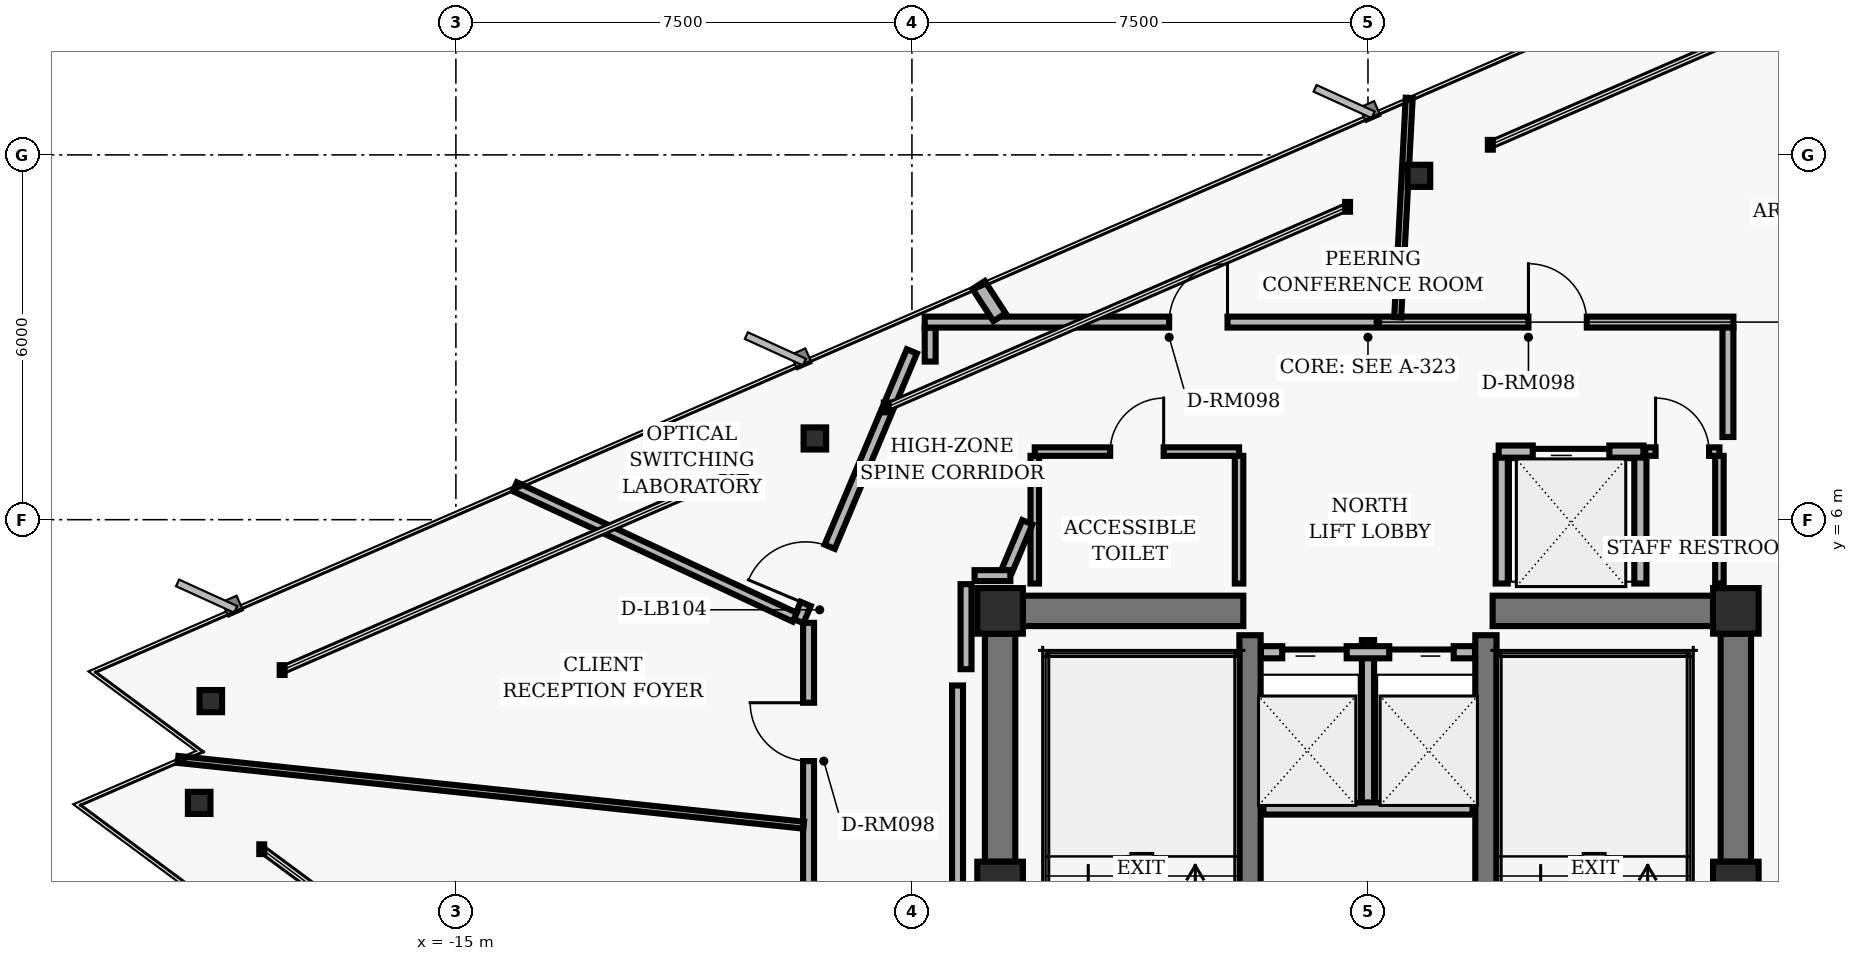
"""IFC4 building model, lengths in metres.
Left out: names, types, materials, properties, quantities, classifications, styles, units other than length and angle.
Written with IfcOpenShell. Run it as: python <this file> out.ifc"""

import sys

from ifc_helpers import new_model, si_unit, direction, frame, frame_2d, origin, origin_2d, place, context, subcontext, project, spatial, rectangle, hollow_rectangle, i_section, extrude, element, fill, save


model = new_model("IFC4")
c1 = context("Model", 3, precision=1e-05, world=origin(), true_north=direction((0.0, 1.0)))
c2 = subcontext(c1, "Body", "Model", "MODEL_VIEW")
j1 = project(units=[si_unit("LENGTHUNIT", "METRE"), si_unit("PLANEANGLEUNIT", "RADIAN")], contexts=[c1])
p1 = place(None, origin())
s1 = spatial("IfcSite", under=j1, at=p1, CompositionType="ELEMENT")
p2 = place(p1, origin())
s2 = spatial("IfcBuilding", under=s1, at=p2, CompositionType="ELEMENT")
p3 = place(p2, frame((0.0, 0.0, 230.08)))
s3 = spatial("IfcBuildingStorey", under=s2, at=p3, CompositionType="ELEMENT", Elevation=230.08)
for number, where, z_axis, x_axis in (
    (1, (-6.05, 4.5, 0.0), (0.0, 0.0, 1.0), (1.0, 0.0, 0.0)),
    (2, (6.05, 4.5, 0.0), (0.0, 0.0, 1.0), (1.0, 0.0, 0.0)),
    (3, (-6.05, 0.0, 0.0), (0.0, 0.0, 1.0), (1.0, 0.0, 0.0)),
    (4, (6.05, 0.0, 0.0), (0.0, 0.0, 1.0), (1.0, 0.0, 0.0)),
):
    element("IfcColumn", number, at=place(p3, frame(where, z_axis=z_axis, x_axis=x_axis)), inside=s3, PredefinedType="COLUMN", context=c2, shape_type="SweptSolid", body=[
        extrude(hollow_rectangle(XDim=0.75, YDim=0.75, WallThickness=0.05, InnerFilletRadius=0.02, OuterFilletRadius=0.04, at=origin_2d()), origin(), (0.0, 0.0, 1.0), 3.04),
    ])
for number, where, z_axis, x_axis in (
    (5, (-6.05, 0.375, 0.0), (0.0, 0.0, 1.0), (0.0, 1.0, 0.0)),
    (6, (6.05, 0.375, 0.0), (0.0, 0.0, 1.0), (0.0, 1.0, 0.0)),
):
    element("IfcWall", number, at=place(p3, frame(where, z_axis=z_axis, x_axis=x_axis)), inside=s3, PredefinedType="SHEAR", context=c2, shape_type="SweptSolid", body=[
        extrude(rectangle(XDim=3.75, YDim=0.5, at=frame_2d((1.875, 0.0))), origin(), (0.0, 0.0, 1.0), 2.798),
    ])
for number, where, z_axis, x_axis in (
    (7, (-1.94, -4.1, 0.0), (0.0, 0.0, 1.0), (0.0, 1.0, 0.0)),
    (8, (1.94, -4.1, 0.0), (0.0, 0.0, 1.0), (0.0, 1.0, 0.0)),
):
    element("IfcWall", number, at=place(p3, frame(where, z_axis=z_axis, x_axis=x_axis)), inside=s3, PredefinedType="SHEAR", context=c2, shape_type="SweptSolid", body=[
        extrude(rectangle(XDim=8.2, YDim=0.35, at=frame_2d((4.1, 0.0))), origin(), (0.0, 0.0, 1.0), 2.798),
    ])
for number, where, z_axis, x_axis in (
    (9, (-5.675, 4.5, 0.0), (0.0, 0.0, 1.0), (1.0, 0.0, 0.0)),
    (10, (2.05, 4.5, 0.0), (0.0, 0.0, 1.0), (1.0, 0.0, 0.0)),
):
    element("IfcWall", number, at=place(p3, frame(where, z_axis=z_axis, x_axis=x_axis)), inside=s3, PredefinedType="SHEAR", context=c2, shape_type="SweptSolid", body=[
        extrude(rectangle(XDim=3.625, YDim=0.5, at=frame_2d((1.812, 0.0))), origin(), (0.0, 0.0, 1.0), 2.798),
    ])
for number, where, z_axis, x_axis in (
    (11, (0.838, 11.656, 0.0), (0.0, 0.0, 1.0), (1.0, 0.0, 0.0)),
    (12, (-9.096, 7.336, 0.0), (0.0, 0.0, 1.0), (1.0, 0.0, 0.0)),
    (13, (-19.031, 3.016, 0.0), (0.0, 0.0, 1.0), (1.0, 0.0, 0.0)),
    (14, (-19.222, 1.342, 0.0), (0.0, 0.0, 1.0), (1.0, 0.0, 0.0)),
):
    element("IfcColumn", number, at=place(p3, frame(where, z_axis=z_axis, x_axis=x_axis)), inside=s3, PredefinedType="COLUMN", context=c2, shape_type="SweptSolid", body=[
        extrude(i_section(OverallWidth=0.371, OverallDepth=0.364, WebThickness=0.013, FlangeThickness=0.022, FilletRadius=0.015, at=origin_2d()), origin(), (0.0, 0.0, 1.0), 3.04),
    ])
p4 = place(p3, frame((0.0, 1.25, 0.0), z_axis=(0.0, 0.0, 1.0), x_axis=(0.0, 1.0, 0.0)))
e15 = element("IfcWall", 15, at=p4, inside=s3, PredefinedType="PARTITIONING", context=c2, shape_type="SweptSolid", body=[
    extrude(rectangle(XDim=2.77, YDim=0.2, at=frame_2d((1.385, 0.0))), origin(), (0.0, 0.0, 1.0), 2.773),
])
p5 = place(p3, frame((-1.72, 1.25, 0.0), z_axis=(0.0, 0.0, 1.0), x_axis=(1.0, 0.0, 0.0)))
e16 = element("IfcWall", 16, at=p5, inside=s3, PredefinedType="PARTITIONING", context=c2, shape_type="SweptSolid", body=[
    extrude(rectangle(XDim=3.44, YDim=0.2, at=frame_2d((1.72, 0.0))), origin(), (0.0, 0.0, 1.0), 2.773),
])
p6 = place(p3, frame((-1.76, 3.82, 0.0), z_axis=(0.0, 0.0, 1.0), x_axis=(1.0, 0.0, 0.0)))
e17 = element("IfcWall", 17, at=p6, inside=s3, PredefinedType="PARTITIONING", context=c2, shape_type="SweptSolid", body=[
    extrude(rectangle(XDim=3.52, YDim=0.2, at=frame_2d((1.76, 0.0))), origin(), (0.0, 0.0, 1.0), 2.773),
])
p7 = place(p6, frame((0.35, 0.0, 0.0)))
e18 = element("IfcOpeningElement", 18, at=p7, cuts=e17, PredefinedType="OPENING", context=c2, shape_type="SweptSolid", body=[
    extrude(rectangle(XDim=1.06, YDim=2.04, at=frame_2d((0.53, 1.02))), frame((0.0, 0.11, 0.0), z_axis=(0.0, -1.0, 0.0), x_axis=(1.0, 0.0, 0.0)), (0.0, 0.0, 1.0), 0.22),
])
p8 = place(p6, frame((2.11, 0.0, 0.0)))
e19 = element("IfcOpeningElement", 19, at=p8, cuts=e17, PredefinedType="OPENING", context=c2, shape_type="SweptSolid", body=[
    extrude(rectangle(XDim=1.06, YDim=2.04, at=frame_2d((0.53, 1.02))), frame((0.0, 0.11, 0.0), z_axis=(0.0, -1.0, 0.0), x_axis=(1.0, 0.0, 0.0)), (0.0, 0.0, 1.0), 0.22),
])
for number, where, z_axis, x_axis in (
    (20, (2.2, 4.95, 0.0), (0.0, 0.0, 1.0), (0.0, 1.0, 0.0)),
    (21, (4.48, 4.95, 0.0), (0.0, 0.0, 1.0), (0.0, 1.0, 0.0)),
):
    element("IfcWall", number, at=place(p3, frame(where, z_axis=z_axis, x_axis=x_axis)), inside=s3, PredefinedType="PARTITIONING", context=c2, shape_type="SweptSolid", body=[
        extrude(rectangle(XDim=2.1, YDim=0.2, at=frame_2d((1.05, 0.0))), origin(), (0.0, 0.0, 1.0), 2.773),
    ])
p9 = place(p3, frame((2.15, 7.12, 0.0), z_axis=(0.0, 0.0, 1.0), x_axis=(1.0, 0.0, 0.0)))
e22 = element("IfcWall", 22, at=p9, inside=s3, PredefinedType="PARTITIONING", context=c2, shape_type="SweptSolid", body=[
    extrude(rectangle(XDim=2.38, YDim=0.2, at=frame_2d((1.19, 0.0))), origin(), (0.0, 0.0, 1.0), 2.395),
])
p10 = place(p9, frame((0.56, 0.0, 0.0)))
e23 = element("IfcOpeningElement", 23, at=p10, cuts=e22, PredefinedType="OPENING", context=c2, shape_type="SweptSolid", body=[
    extrude(rectangle(XDim=1.26, YDim=2.06, at=frame_2d((0.63, 1.03))), frame((0.0, 0.11, 0.0), z_axis=(0.0, -1.0, 0.0), x_axis=(1.0, 0.0, 0.0)), (0.0, 0.0, 1.0), 0.22),
])
for number, where, z_axis, x_axis in (
    (24, (-5.48, 4.95, 0.0), (0.0, 0.0, 1.0), (0.0, 1.0, 0.0)),
    (25, (-2.12, 4.95, 0.0), (0.0, 0.0, 1.0), (0.0, 1.0, 0.0)),
):
    element("IfcWall", number, at=place(p3, frame(where, z_axis=z_axis, x_axis=x_axis)), inside=s3, PredefinedType="PARTITIONING", context=c2, shape_type="SweptSolid", body=[
        extrude(rectangle(XDim=2.1, YDim=0.14, at=frame_2d((1.05, 0.0))), origin(), (0.0, 0.0, 1.0), 2.773),
    ])
p11 = place(p3, frame((-5.48, 7.12, 0.0), z_axis=(0.0, 0.0, 1.0), x_axis=(1.0, 0.0, 0.0)))
e26 = element("IfcWall", 26, at=p11, inside=s3, PredefinedType="PARTITIONING", context=c2, shape_type="SweptSolid", body=[
    extrude(rectangle(XDim=3.36, YDim=0.14, at=frame_2d((1.68, 0.0))), origin(), (0.0, 0.0, 1.0), 2.395),
])
p12 = place(p11, frame((1.24, 0.0, 0.0)))
e27 = element("IfcOpeningElement", 27, at=p12, cuts=e26, PredefinedType="OPENING", context=c2, shape_type="SweptSolid", body=[
    extrude(rectangle(XDim=0.88, YDim=2.02, at=frame_2d((0.44, 1.01))), frame((0.0, 0.08, 0.0), z_axis=(0.0, -1.0, 0.0), x_axis=(1.0, 0.0, 0.0)), (0.0, 0.0, 1.0), 0.16),
])
p13 = place(p3, frame((5.78, 4.95, 0.0), z_axis=(0.0, 0.0, 1.0), x_axis=(0.0, 1.0, 0.0)))
e28 = element("IfcWall", 28, at=p13, inside=s3, PredefinedType="PARTITIONING", context=c2, shape_type="SweptSolid", body=[
    extrude(rectangle(XDim=2.1, YDim=0.14, at=frame_2d((1.05, 0.0))), origin(), (0.0, 0.0, 1.0), 2.773),
])
p14 = place(p3, frame((4.56, 7.12, 0.0), z_axis=(0.0, 0.0, 1.0), x_axis=(1.0, 0.0, 0.0)))
e29 = element("IfcWall", 29, at=p14, inside=s3, PredefinedType="PARTITIONING", context=c2, shape_type="SweptSolid", body=[
    extrude(rectangle(XDim=1.22, YDim=0.14, at=frame_2d((0.61, 0.0))), origin(), (0.0, 0.0, 1.0), 2.773),
])
p15 = place(p14, frame((0.17, 0.0, 0.0)))
e30 = element("IfcOpeningElement", 30, at=p15, cuts=e29, PredefinedType="OPENING", context=c2, shape_type="SweptSolid", body=[
    extrude(rectangle(XDim=0.88, YDim=2.02, at=frame_2d((0.44, 1.01))), frame((0.0, 0.08, 0.0), z_axis=(0.0, -1.0, 0.0), x_axis=(1.0, 0.0, 0.0)), (0.0, 0.0, 1.0), 0.16),
])
p16 = place(p3, frame((-9.2, -4.303, 0.0), z_axis=(0.0, 0.0, 1.0), x_axis=(0.0, 1.0, 0.0)))
e31 = element("IfcWall", 31, at=p16, inside=s3, PredefinedType="PARTITIONING", context=c2, shape_type="SweptSolid", body=[
    extrude(rectangle(XDim=8.607, YDim=0.18, at=frame_2d((4.303, 0.0))), origin(), (0.0, 0.0, 1.0), 2.773),
])
p17 = place(p16, frame((2.289, 0.0, 0.0)))
e32 = element("IfcOpeningElement", 32, at=p17, cuts=e31, PredefinedType="OPENING", context=c2, shape_type="SweptSolid", body=[
    extrude(rectangle(XDim=0.96, YDim=2.02, at=frame_2d((0.48, 1.01))), frame((0.0, 0.1, 0.0), z_axis=(0.0, -1.0, 0.0), x_axis=(1.0, 0.0, 0.0)), (0.0, 0.0, 1.0), 0.2),
])
p18 = place(p16, frame((6.333, 0.0, 0.0)))
e33 = element("IfcOpeningElement", 33, at=p18, cuts=e31, PredefinedType="OPENING", context=c2, shape_type="SweptSolid", body=[
    extrude(rectangle(XDim=0.96, YDim=2.02, at=frame_2d((0.48, 1.01))), frame((0.0, 0.1, 0.0), z_axis=(0.0, -1.0, 0.0), x_axis=(1.0, 0.0, 0.0)), (0.0, 0.0, 1.0), 0.2),
])
p19 = place(p3, frame((-9.367, 4.332, 0.0), z_axis=(0.0, 0.0, 1.0), x_axis=(0.387573945081, 0.921838617706, 0.0)))
e34 = element("IfcWall", 34, at=p19, inside=s3, PredefinedType="PARTITIONING", context=c2, shape_type="SweptSolid", body=[
    extrude(rectangle(XDim=4.813, YDim=0.18, at=frame_2d((2.407, 0.0))), origin(), (0.0, 0.0, 1.0), 2.773),
])
p20 = place(p19, frame((0.307, 0.0, 0.0)))
e35 = element("IfcOpeningElement", 35, at=p20, cuts=e34, PredefinedType="OPENING", context=c2, shape_type="SweptSolid", body=[
    extrude(rectangle(XDim=1.02, YDim=2.02, at=frame_2d((0.51, 1.01))), frame((0.0, 0.1, 0.0), z_axis=(0.0, -1.0, 0.0), x_axis=(1.0, 0.0, 0.0)), (0.0, 0.0, 1.0), 0.2),
])
p21 = place(p3, frame((-7.2, 8.601, 0.0), z_axis=(0.0, 0.0, 1.0), x_axis=(0.0, 1.0, 0.0)))
e36 = element("IfcWall", 36, at=p21, inside=s3, PredefinedType="PARTITIONING", context=c2, shape_type="SweptSolid", body=[
    extrude(rectangle(XDim=0.559, YDim=0.18, at=frame_2d((0.28, 0.0))), origin(), (0.0, 0.0, 1.0), 2.773),
])
p22 = place(p3, frame((-7.29, 9.25, 0.0), z_axis=(0.0, 0.0, 1.0), x_axis=(1.0, 0.0, 0.0)))
e37 = element("IfcWall", 37, at=p22, inside=s3, PredefinedType="PARTITIONING", context=c2, shape_type="SweptSolid", body=[
    extrude(rectangle(XDim=13.3, YDim=0.18, at=frame_2d((6.65, 0.0))), origin(), (0.0, 0.0, 1.0), 2.395),
])
p23 = place(p22, frame((9.929, 0.0, 0.0)))
e38 = element("IfcOpeningElement", 38, at=p23, cuts=e37, PredefinedType="OPENING", context=c2, shape_type="SweptSolid", body=[
    extrude(rectangle(XDim=0.96, YDim=2.02, at=frame_2d((0.48, 1.01))), frame((0.0, 0.1, 0.0), z_axis=(0.0, -1.0, 0.0), x_axis=(1.0, 0.0, 0.0)), (0.0, 0.0, 1.0), 0.2),
])
p24 = place(p22, frame((4.02, 0.0, 0.0)))
e39 = element("IfcOpeningElement", 39, at=p24, cuts=e37, PredefinedType="OPENING", context=c2, shape_type="SweptSolid", body=[
    extrude(rectangle(XDim=0.96, YDim=2.02, at=frame_2d((0.48, 1.01))), frame((0.0, 0.1, 0.0), z_axis=(0.0, -1.0, 0.0), x_axis=(1.0, 0.0, 0.0)), (0.0, 0.0, 1.0), 0.2),
])
p25 = place(p3, frame((5.92, 9.16, 0.0), z_axis=(0.0, 0.0, 1.0), x_axis=(0.0, -1.0, 0.0)))
e40 = element("IfcWall", 40, at=p25, inside=s3, PredefinedType="PARTITIONING", context=c2, shape_type="SweptSolid", body=[
    extrude(rectangle(XDim=1.8, YDim=0.18, at=frame_2d((0.9, 0.0))), origin(), (0.0, 0.0, 1.0), 2.773),
])
p26 = place(p3, frame((-5.602, 5.958, 0.0), z_axis=(0.0, 0.0, 1.0), x_axis=(-0.387588639363, -0.921832439566, 0.0)))
e41 = element("IfcWall", 41, at=p26, inside=s3, PredefinedType="PARTITIONING", context=c2, shape_type="SweptSolid", body=[
    extrude(rectangle(XDim=0.862, YDim=0.18, at=frame_2d((0.431, 0.0))), origin(), (0.0, 0.0, 1.0), 2.773),
])
p27 = place(p3, frame((-5.881, 5.08, 0.0), z_axis=(0.0, 0.0, 1.0), x_axis=(-1.0, 0.0, 0.0)))
e42 = element("IfcWall", 42, at=p27, inside=s3, PredefinedType="PARTITIONING", context=c2, shape_type="SweptSolid", body=[
    extrude(rectangle(XDim=0.589, YDim=0.18, at=frame_2d((0.294, 0.0))), origin(), (0.0, 0.0, 1.0), 2.773),
])
p28 = place(p3, frame((-6.61, 4.94, 0.0), z_axis=(0.0, 0.0, 1.0), x_axis=(0.0, -1.0, 0.0)))
e43 = element("IfcWall", 43, at=p28, inside=s3, PredefinedType="PARTITIONING", context=c2, shape_type="SweptSolid", body=[
    extrude(rectangle(XDim=1.399, YDim=0.18, at=frame_2d((0.699, 0.0))), origin(), (0.0, 0.0, 1.0), 2.773),
])
p29 = place(p3, frame((-6.75, 3.273, 0.0), z_axis=(0.0, 0.0, 1.0), x_axis=(0.0, -1.0, 0.0)))
e44 = element("IfcWall", 44, at=p29, inside=s3, PredefinedType="PARTITIONING", context=c2, shape_type="SweptSolid", body=[
    extrude(rectangle(XDim=6.547, YDim=0.18, at=frame_2d((3.273, 0.0))), origin(), (0.0, 0.0, 1.0), 2.773),
])
p30 = place(p3, frame((0.489, 9.33, 0.0), z_axis=(0.0, 0.0, 1.0), x_axis=(0.05229993373, 0.998631421963, 0.0)))
e45 = element("IfcWall", 45, at=p30, inside=s3, PredefinedType="MOVABLE", context=c2, shape_type="SweptSolid", body=[
    extrude(rectangle(XDim=3.613, YDim=0.115, at=frame_2d((1.807, 0.0))), origin(), (0.0, 0.0, 1.0), 2.773),
])
p31 = place(p3, frame((-6.059, 9.33, 0.0), z_axis=(0.0, 0.0, 1.0), x_axis=(-0.54466198204, 0.838655665527, 0.0)))
e46 = element("IfcWall", 46, at=p31, inside=s3, PredefinedType="PARTITIONING", context=c2, shape_type="SweptSolid", body=[
    extrude(rectangle(XDim=0.631, YDim=0.24, at=frame_2d((0.315, 0.0))), origin(), (0.0, 0.0, 1.0), 2.773),
])
p32 = place(p3, frame((-9.427, 4.396, 0.0), z_axis=(0.0, 0.0, 1.0), x_axis=(-0.906319380456, 0.422593398682, 0.0)))
e47 = element("IfcWall", 47, at=p32, inside=s3, PredefinedType="PARTITIONING", context=c2, shape_type="SweptSolid", body=[
    extrude(rectangle(XDim=5.08, YDim=0.16, at=frame_2d((2.54, 0.0))), origin(), (0.0, 0.0, 1.0), 2.773),
])
p33 = place(p3, frame((-9.28, 0.975, 0.0), z_axis=(0.0, 0.0, 1.0), x_axis=(-0.994520958229, 0.104537379166, 0.0)))
e48 = element("IfcWall", 48, at=p33, inside=s3, PredefinedType="MOVABLE", context=c2, shape_type="SweptSolid", body=[
    extrude(rectangle(XDim=10.346, YDim=0.115, at=frame_2d((5.173, 0.0))), origin(), (0.0, 0.0, 1.0), 2.773),
])
p34 = place(p7, origin())
e49 = element("IfcDoor", 49, at=p34, inside=s3, OperationType="SLIDING_TO_LEFT", PredefinedType="DOOR", context=c2, shape_type="SweptSolid", body=[
    extrude(rectangle(XDim=1.06, YDim=2.04, at=frame_2d((0.53, 1.02))), frame((0.0, 0.025, 0.0), z_axis=(0.0, -1.0, 0.0), x_axis=(1.0, 0.0, 0.0)), (0.0, 0.0, 1.0), 0.05),
])
fill(e18, e49)
p35 = place(p8, origin())
e50 = element("IfcDoor", 50, at=p35, inside=s3, OperationType="SLIDING_TO_RIGHT", PredefinedType="DOOR", context=c2, shape_type="SweptSolid", body=[
    extrude(rectangle(XDim=1.06, YDim=2.04, at=frame_2d((0.53, 1.02))), frame((0.0, 0.025, 0.0), z_axis=(0.0, -1.0, 0.0), x_axis=(1.0, 0.0, 0.0)), (0.0, 0.0, 1.0), 0.05),
])
fill(e19, e50)
p36 = place(p10, origin())
e51 = element("IfcDoor", 51, at=p36, inside=s3, OperationType="SLIDING_TO_LEFT", PredefinedType="DOOR", context=c2, shape_type="SweptSolid", body=[
    extrude(rectangle(XDim=1.26, YDim=2.06, at=frame_2d((0.63, 1.03))), frame((0.0, 0.025, 0.0), z_axis=(0.0, -1.0, 0.0), x_axis=(1.0, 0.0, 0.0)), (0.0, 0.0, 1.0), 0.05),
])
fill(e23, e51)
p37 = place(p12, origin())
e52 = element("IfcDoor", 52, at=p37, inside=s3, OperationType="SINGLE_SWING_RIGHT", PredefinedType="DOOR", context=c2, shape_type="SweptSolid", body=[
    extrude(rectangle(XDim=0.88, YDim=2.02, at=frame_2d((0.44, 1.01))), frame((0.0, 0.025, 0.0), z_axis=(0.0, -1.0, 0.0), x_axis=(1.0, 0.0, 0.0)), (0.0, 0.0, 1.0), 0.05),
])
fill(e27, e52)
p38 = place(p15, origin())
e53 = element("IfcDoor", 53, at=p38, inside=s3, OperationType="SINGLE_SWING_LEFT", PredefinedType="DOOR", context=c2, shape_type="SweptSolid", body=[
    extrude(rectangle(XDim=0.88, YDim=2.02, at=frame_2d((0.44, 1.01))), frame((0.0, 0.025, 0.0), z_axis=(0.0, -1.0, 0.0), x_axis=(1.0, 0.0, 0.0)), (0.0, 0.0, 1.0), 0.05),
])
fill(e30, e53)
p39 = place(p23, origin())
e54 = element("IfcDoor", 54, at=p39, inside=s3, OperationType="SINGLE_SWING_LEFT", PredefinedType="DOOR", context=c2, shape_type="SweptSolid", body=[
    extrude(rectangle(XDim=0.96, YDim=2.02, at=frame_2d((0.48, 1.01))), frame((0.0, 0.025, 0.0), z_axis=(0.0, -1.0, 0.0), x_axis=(1.0, 0.0, 0.0)), (0.0, 0.0, 1.0), 0.05),
])
fill(e38, e54)
p40 = place(p24, origin())
e55 = element("IfcDoor", 55, at=p40, inside=s3, OperationType="SINGLE_SWING_RIGHT", PredefinedType="DOOR", context=c2, shape_type="SweptSolid", body=[
    extrude(rectangle(XDim=0.96, YDim=2.02, at=frame_2d((0.48, 1.01))), frame((0.0, 0.025, 0.0), z_axis=(0.0, -1.0, 0.0), x_axis=(1.0, 0.0, 0.0)), (0.0, 0.0, 1.0), 0.05),
])
fill(e39, e55)
p41 = place(p20, origin())
e56 = element("IfcDoor", 56, at=p41, inside=s3, OperationType="SINGLE_SWING_LEFT", PredefinedType="DOOR", context=c2, shape_type="SweptSolid", body=[
    extrude(rectangle(XDim=1.02, YDim=2.02, at=frame_2d((0.51, 1.01))), frame((0.0, 0.025, 0.0), z_axis=(0.0, -1.0, 0.0), x_axis=(1.0, 0.0, 0.0)), (0.0, 0.0, 1.0), 0.05),
])
fill(e35, e56)
p42 = place(p18, origin())
e57 = element("IfcDoor", 57, at=p42, inside=s3, OperationType="SINGLE_SWING_RIGHT", PredefinedType="DOOR", context=c2, shape_type="SweptSolid", body=[
    extrude(rectangle(XDim=0.96, YDim=2.02, at=frame_2d((0.48, 1.01))), frame((0.0, 0.025, 0.0), z_axis=(0.0, -1.0, 0.0), x_axis=(1.0, 0.0, 0.0)), (0.0, 0.0, 1.0), 0.05),
])
fill(e33, e57)
save(model, sys.argv[1])
